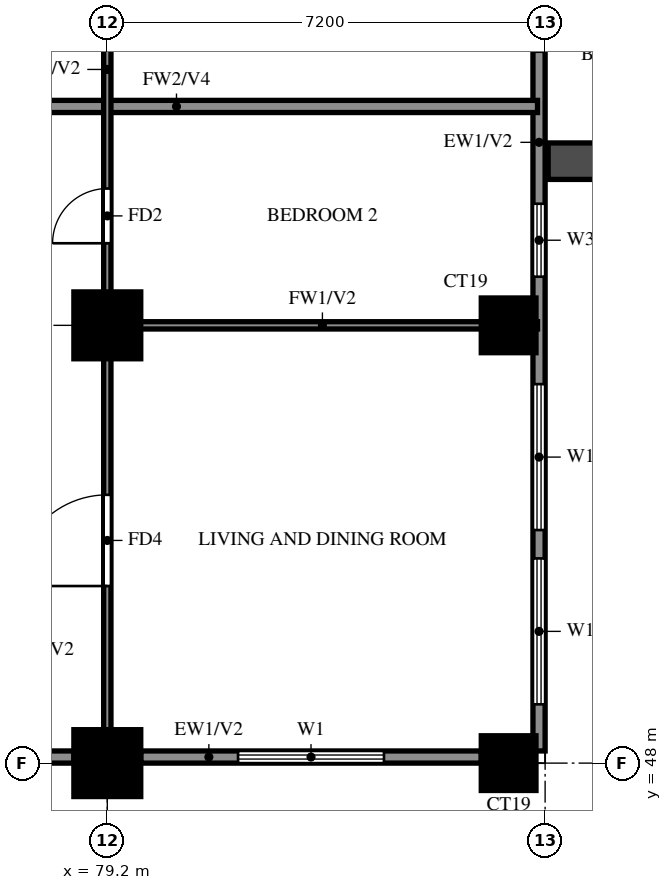
"""IFC4 building model, lengths in metres.
Left out: names, types, materials, properties, quantities, classifications, styles, units other than length and angle.
Written with IfcOpenShell. Run it as: python <this file> out.ifc"""

import sys

from ifc_helpers import new_model, si_unit, direction, frame, frame_2d, origin, origin_2d, place, context, subcontext, project, spatial, rectangle, extrude, source, transform, mapped, element, fill, save


model = new_model("IFC4")
c1 = context("Model", 3, precision=1e-05, world=origin(), true_north=direction((0.0, 1.0)))
c2 = subcontext(c1, "Body", "Model", "MODEL_VIEW")
j1 = project(units=[si_unit("LENGTHUNIT", "METRE"), si_unit("PLANEANGLEUNIT", "RADIAN")], contexts=[c1])
p1 = place(None, origin())
s1 = spatial("IfcSite", under=j1, at=p1, CompositionType="ELEMENT")
p2 = place(p1, origin())
s2 = spatial("IfcBuilding", under=s1, at=p2, CompositionType="ELEMENT")
p3 = place(p2, frame((0.0, 0.0, 127.0)))
s3 = spatial("IfcBuildingStorey", under=s2, at=p3, CompositionType="ELEMENT", Elevation=127.0)
m1 = source(origin(), c2, "Body", "SweptSolid", [
    extrude(rectangle(XDim=1.1, YDim=1.1, at=origin_2d()), origin(), (0.0, 0.0, 1.0), 3.2),
])
p4 = place(p3, frame((79.2, 48.0, 0.0), z_axis=(0.0, 0.0, 1.0), x_axis=(1.0, 0.0, 0.0)))
e1 = element("IfcColumn", 1, at=p4, inside=s3, PredefinedType="COLUMN", context=c2, shape_type="MappedRepresentation", body=[
    mapped(m1, transform((0.0, 0.0, 0.0))),
])
m2 = source(origin(), c2, "Body", "SweptSolid", [
    extrude(rectangle(XDim=0.9, YDim=0.9, at=origin_2d()), origin(), (0.0, 0.0, 1.0), 3.2),
])
p5 = place(p3, frame((85.8, 48.0, 0.0), z_axis=(0.0, 0.0, 1.0), x_axis=(1.0, 0.0, 0.0)))
e2 = element("IfcColumn", 2, at=p5, inside=s3, PredefinedType="COLUMN", context=c2, shape_type="MappedRepresentation", body=[
    mapped(m2, transform((0.0, 0.0, 0.0))),
])
p6 = place(p3, frame((79.2, 55.2, 0.0), z_axis=(0.0, 0.0, 1.0), x_axis=(1.0, 0.0, 0.0)))
e3 = element("IfcColumn", 3, at=p6, inside=s3, PredefinedType="COLUMN", context=c2, shape_type="MappedRepresentation", body=[
    mapped(m1, transform((0.0, 0.0, 0.0))),
])
p7 = place(p3, frame((85.8, 55.2, 0.0), z_axis=(0.0, 0.0, 1.0), x_axis=(1.0, 0.0, 0.0)))
e4 = element("IfcColumn", 4, at=p7, inside=s3, PredefinedType="COLUMN", context=c2, shape_type="MappedRepresentation", body=[
    mapped(m2, transform((0.0, 0.0, 0.0))),
])
p8 = place(p3, frame((85.719, 39.881, 0.0), z_axis=(0.0, 0.0, 1.0), x_axis=(-0.86377618652, 0.503875678716, 0.0)))
e5 = element("IfcWall", 5, at=p8, inside=s3, PredefinedType="SOLIDWALL", context=c2, shape_type="SweptSolid", body=[
    extrude(rectangle(XDim=16.311, YDim=0.2, at=frame_2d((8.156, 0.0))), origin(), (0.0, 0.0, 1.0), 3.2),
])
p9 = place(p8, frame((13.326, 0.0, 1.5)))
e6 = element("IfcOpeningElement", 6, at=p9, cuts=e5, PredefinedType="OPENING", context=c2, shape_type="SweptSolid", body=[
    extrude(rectangle(XDim=0.9, YDim=0.9, at=frame_2d((0.45, 0.45))), frame((0.0, 0.11, 0.0), z_axis=(0.0, -1.0, 0.0), x_axis=(1.0, 0.0, 0.0)), (0.0, 0.0, 1.0), 0.22),
])
p10 = place(p3, frame((71.99, 48.1, 0.0), z_axis=(0.0, 0.0, 1.0), x_axis=(1.0, 0.0, 0.0)))
e7 = element("IfcWall", 7, at=p10, inside=s3, PredefinedType="SOLIDWALL", context=c2, shape_type="SweptSolid", body=[
    extrude(rectangle(XDim=6.66, YDim=0.2, at=frame_2d((3.33, 0.0))), origin(), (0.0, 0.0, 1.0), 3.2),
])
p11 = place(p3, frame((79.75, 48.1, 0.0), z_axis=(0.0, 0.0, 1.0), x_axis=(1.0, 0.0, 0.0)))
e8 = element("IfcWall", 8, at=p11, inside=s3, PredefinedType="SOLIDWALL", context=c2, shape_type="SweptSolid", body=[
    extrude(rectangle(XDim=5.6, YDim=0.2, at=frame_2d((2.8, 0.0))), origin(), (0.0, 0.0, 1.0), 3.2),
])
p12 = place(p11, frame((1.6, 0.0, 0.6)))
e9 = element("IfcOpeningElement", 9, at=p12, cuts=e8, PredefinedType="OPENING", context=c2, shape_type="SweptSolid", body=[
    extrude(rectangle(XDim=2.4, YDim=2.4, at=frame_2d((1.2, 1.2))), frame((0.0, 0.11, 0.0), z_axis=(0.0, -1.0, 0.0), x_axis=(1.0, 0.0, 0.0)), (0.0, 0.0, 1.0), 0.22),
])
p13 = place(p3, frame((86.3, 48.2, 0.0), z_axis=(0.0, 0.0, 1.0), x_axis=(0.0, 1.0, 0.0)))
e10 = element("IfcWall", 10, at=p13, inside=s3, PredefinedType="SOLIDWALL", context=c2, shape_type="SweptSolid", body=[
    extrude(rectangle(XDim=28.6, YDim=0.2, at=frame_2d((14.3, 0.0))), origin(), (0.0, 0.0, 1.0), 3.2),
])
p14 = place(p13, frame((11.5, 0.0, 0.0)))
e11 = element("IfcOpeningElement", 11, at=p14, cuts=e10, PredefinedType="OPENING", context=c2, shape_type="SweptSolid", body=[
    extrude(rectangle(XDim=1.8, YDim=2.4, at=frame_2d((0.9, 1.2))), frame((0.0, 0.11, 0.0), z_axis=(0.0, -1.0, 0.0), x_axis=(1.0, 0.0, 0.0)), (0.0, 0.0, 1.0), 0.22),
])
p15 = place(p13, frame((0.767, 0.0, 0.6)))
e12 = element("IfcOpeningElement", 12, at=p15, cuts=e10, PredefinedType="OPENING", context=c2, shape_type="SweptSolid", body=[
    extrude(rectangle(XDim=2.4, YDim=2.4, at=frame_2d((1.2, 1.2))), frame((0.0, 0.11, 0.0), z_axis=(0.0, -1.0, 0.0), x_axis=(1.0, 0.0, 0.0)), (0.0, 0.0, 1.0), 0.22),
])
p16 = place(p13, frame((3.633, 0.0, 0.6)))
e13 = element("IfcOpeningElement", 13, at=p16, cuts=e10, PredefinedType="OPENING", context=c2, shape_type="SweptSolid", body=[
    extrude(rectangle(XDim=2.4, YDim=2.4, at=frame_2d((1.2, 1.2))), frame((0.0, 0.11, 0.0), z_axis=(0.0, -1.0, 0.0), x_axis=(1.0, 0.0, 0.0)), (0.0, 0.0, 1.0), 0.22),
])
p17 = place(p13, frame((7.8, 0.0, 0.6)))
e14 = element("IfcOpeningElement", 14, at=p17, cuts=e10, PredefinedType="OPENING", context=c2, shape_type="SweptSolid", body=[
    extrude(rectangle(XDim=1.2, YDim=2.4, at=frame_2d((0.6, 1.2))), frame((0.0, 0.11, 0.0), z_axis=(0.0, -1.0, 0.0), x_axis=(1.0, 0.0, 0.0)), (0.0, 0.0, 1.0), 0.22),
])
p18 = place(p13, frame((14.85, 0.0, 0.6)))
e15 = element("IfcOpeningElement", 15, at=p18, cuts=e10, PredefinedType="OPENING", context=c2, shape_type="SweptSolid", body=[
    extrude(rectangle(XDim=0.9, YDim=2.4, at=frame_2d((0.45, 1.2))), frame((0.0, 0.11, 0.0), z_axis=(0.0, -1.0, 0.0), x_axis=(1.0, 0.0, 0.0)), (0.0, 0.0, 1.0), 0.22),
])
p19 = place(p13, frame((16.75, 0.0, 0.6)))
e16 = element("IfcOpeningElement", 16, at=p19, cuts=e10, PredefinedType="OPENING", context=c2, shape_type="SweptSolid", body=[
    extrude(rectangle(XDim=0.9, YDim=2.4, at=frame_2d((0.45, 1.2))), frame((0.0, 0.11, 0.0), z_axis=(0.0, -1.0, 0.0), x_axis=(1.0, 0.0, 0.0)), (0.0, 0.0, 1.0), 0.22),
])
p20 = place(p13, frame((18.2, 0.0, 0.6)))
e17 = element("IfcOpeningElement", 17, at=p20, cuts=e10, PredefinedType="OPENING", context=c2, shape_type="SweptSolid", body=[
    extrude(rectangle(XDim=2.4, YDim=2.4, at=frame_2d((1.2, 1.2))), frame((0.0, 0.11, 0.0), z_axis=(0.0, -1.0, 0.0), x_axis=(1.0, 0.0, 0.0)), (0.0, 0.0, 1.0), 0.22),
])
p21 = place(p13, frame((22.5, 0.0, 0.6)))
e18 = element("IfcOpeningElement", 18, at=p21, cuts=e10, PredefinedType="OPENING", context=c2, shape_type="SweptSolid", body=[
    extrude(rectangle(XDim=1.8, YDim=2.4, at=frame_2d((0.9, 1.2))), frame((0.0, 0.11, 0.0), z_axis=(0.0, -1.0, 0.0), x_axis=(1.0, 0.0, 0.0)), (0.0, 0.0, 1.0), 0.22),
])
p22 = place(p13, frame((25.4, 0.0, 0.6)))
e19 = element("IfcOpeningElement", 19, at=p22, cuts=e10, PredefinedType="OPENING", context=c2, shape_type="SweptSolid", body=[
    extrude(rectangle(XDim=2.4, YDim=2.4, at=frame_2d((1.2, 1.2))), frame((0.0, 0.11, 0.0), z_axis=(0.0, -1.0, 0.0), x_axis=(1.0, 0.0, 0.0)), (0.0, 0.0, 1.0), 0.22),
])
p23 = place(p3, frame((86.45, 57.9, 0.0), z_axis=(0.0, 0.0, 1.0), x_axis=(1.0, 0.0, 0.0)))
e20 = element("IfcWall", 20, at=p23, inside=s3, PredefinedType="SOLIDWALL", context=c2, shape_type="SweptSolid", body=[
    extrude(rectangle(XDim=2.65, YDim=0.6, at=frame_2d((1.325, 0.0))), origin(), (0.0, 0.0, 1.0), 2.85),
])
p24 = place(p3, frame((74.4, 58.8, 0.0), z_axis=(0.0, 0.0, 1.0), x_axis=(1.0, 0.0, 0.0)))
e21 = element("IfcWall", 21, at=p24, inside=s3, PredefinedType="SOLIDWALL", context=c2, shape_type="SweptSolid", body=[
    extrude(rectangle(XDim=11.875, YDim=0.2, at=frame_2d((5.938, 0.0))), origin(), (0.0, 0.0, 1.0), 2.3),
])
p25 = place(p3, frame((79.2, 55.2, 0.0), z_axis=(0.0, 0.0, 1.0), x_axis=(1.0, 0.0, 0.0)))
e22 = element("IfcWall", 22, at=p25, inside=s3, PredefinedType="PARTITIONING", context=c2, shape_type="SweptSolid", body=[
    extrude(rectangle(XDim=7.075, YDim=0.12, at=frame_2d((3.538, 0.0))), origin(), (0.0, 0.0, 1.0), 3.2),
])
p26 = place(p3, frame((79.2, 48.125, 0.0), z_axis=(0.0, 0.0, 1.0), x_axis=(0.0, 1.0, 0.0)))
e23 = element("IfcWall", 23, at=p26, inside=s3, PredefinedType="PARTITIONING", context=c2, shape_type="SweptSolid", body=[
    extrude(rectangle(XDim=25.075, YDim=0.12, at=frame_2d((12.538, 0.0))), origin(), (0.0, 0.0, 1.0), 3.2),
])
p27 = place(p26, frame((2.788, 0.0, 0.0)))
e24 = element("IfcOpeningElement", 24, at=p27, cuts=e23, PredefinedType="OPENING", context=c2, shape_type="SweptSolid", body=[
    extrude(rectangle(XDim=1.5, YDim=2.1, at=frame_2d((0.75, 1.05))), frame((0.0, 0.07, 0.0), z_axis=(0.0, -1.0, 0.0), x_axis=(1.0, 0.0, 0.0)), (0.0, 0.0, 1.0), 0.14),
])
p28 = place(p26, frame((8.425, 0.0, 0.0)))
e25 = element("IfcOpeningElement", 25, at=p28, cuts=e23, PredefinedType="OPENING", context=c2, shape_type="SweptSolid", body=[
    extrude(rectangle(XDim=0.9, YDim=2.1, at=frame_2d((0.45, 1.05))), frame((0.0, 0.07, 0.0), z_axis=(0.0, -1.0, 0.0), x_axis=(1.0, 0.0, 0.0)), (0.0, 0.0, 1.0), 0.14),
])
p29 = place(p26, frame((12.025, 0.0, 0.0)))
e26 = element("IfcOpeningElement", 26, at=p29, cuts=e23, PredefinedType="OPENING", context=c2, shape_type="SweptSolid", body=[
    extrude(rectangle(XDim=0.9, YDim=2.1, at=frame_2d((0.45, 1.05))), frame((0.0, 0.07, 0.0), z_axis=(0.0, -1.0, 0.0), x_axis=(1.0, 0.0, 0.0)), (0.0, 0.0, 1.0), 0.14),
])
p30 = place(p26, frame((15.625, 0.0, 0.0)))
e27 = element("IfcOpeningElement", 27, at=p30, cuts=e23, PredefinedType="OPENING", context=c2, shape_type="SweptSolid", body=[
    extrude(rectangle(XDim=0.9, YDim=2.1, at=frame_2d((0.45, 1.05))), frame((0.0, 0.07, 0.0), z_axis=(0.0, -1.0, 0.0), x_axis=(1.0, 0.0, 0.0)), (0.0, 0.0, 1.0), 0.14),
])
p31 = place(p26, frame((19.225, 0.0, 0.0)))
e28 = element("IfcOpeningElement", 28, at=p31, cuts=e23, PredefinedType="OPENING", context=c2, shape_type="SweptSolid", body=[
    extrude(rectangle(XDim=0.9, YDim=2.1, at=frame_2d((0.45, 1.05))), frame((0.0, 0.07, 0.0), z_axis=(0.0, -1.0, 0.0), x_axis=(1.0, 0.0, 0.0)), (0.0, 0.0, 1.0), 0.14),
])
p32 = place(p26, frame((22.825, 0.0, 0.0)))
e29 = element("IfcOpeningElement", 29, at=p32, cuts=e23, PredefinedType="OPENING", context=c2, shape_type="SweptSolid", body=[
    extrude(rectangle(XDim=0.9, YDim=2.1, at=frame_2d((0.45, 1.05))), frame((0.0, 0.07, 0.0), z_axis=(0.0, -1.0, 0.0), x_axis=(1.0, 0.0, 0.0)), (0.0, 0.0, 1.0), 0.14),
])
p33 = place(p12, origin())
e30 = element("IfcWindow", 30, at=p33, inside=s3, PartitioningType="DOUBLE_PANEL_VERTICAL", PredefinedType="WINDOW", context=c2, shape_type="SweptSolid", body=[
    extrude(rectangle(XDim=2.4, YDim=2.4, at=frame_2d((1.2, 1.2))), frame((0.0, 0.03, 0.0), z_axis=(0.0, -1.0, 0.0), x_axis=(1.0, 0.0, 0.0)), (0.0, 0.0, 1.0), 0.06),
])
fill(e9, e30)
p34 = place(p14, origin())
e31 = element("IfcDoor", 31, at=p34, inside=s3, OperationType="DOUBLE_DOOR_SLIDING", PredefinedType="DOOR", context=c2, shape_type="SweptSolid", body=[
    extrude(rectangle(XDim=1.8, YDim=2.4, at=frame_2d((0.9, 1.2))), frame((0.0, 0.025, 0.0), z_axis=(0.0, -1.0, 0.0), x_axis=(1.0, 0.0, 0.0)), (0.0, 0.0, 1.0), 0.05),
])
fill(e11, e31)
p35 = place(p15, origin())
e32 = element("IfcWindow", 32, at=p35, inside=s3, PartitioningType="DOUBLE_PANEL_VERTICAL", PredefinedType="WINDOW", context=c2, shape_type="SweptSolid", body=[
    extrude(rectangle(XDim=2.4, YDim=2.4, at=frame_2d((1.2, 1.2))), frame((0.0, 0.03, 0.0), z_axis=(0.0, -1.0, 0.0), x_axis=(1.0, 0.0, 0.0)), (0.0, 0.0, 1.0), 0.06),
])
fill(e12, e32)
p36 = place(p16, origin())
e33 = element("IfcWindow", 33, at=p36, inside=s3, PartitioningType="DOUBLE_PANEL_VERTICAL", PredefinedType="WINDOW", context=c2, shape_type="SweptSolid", body=[
    extrude(rectangle(XDim=2.4, YDim=2.4, at=frame_2d((1.2, 1.2))), frame((0.0, 0.03, 0.0), z_axis=(0.0, -1.0, 0.0), x_axis=(1.0, 0.0, 0.0)), (0.0, 0.0, 1.0), 0.06),
])
fill(e13, e33)
p37 = place(p17, origin())
e34 = element("IfcWindow", 34, at=p37, inside=s3, PartitioningType="SINGLE_PANEL", PredefinedType="WINDOW", context=c2, shape_type="SweptSolid", body=[
    extrude(rectangle(XDim=1.2, YDim=2.4, at=frame_2d((0.6, 1.2))), frame((0.0, 0.03, 0.0), z_axis=(0.0, -1.0, 0.0), x_axis=(1.0, 0.0, 0.0)), (0.0, 0.0, 1.0), 0.06),
])
fill(e14, e34)
p38 = place(p27, origin())
e35 = element("IfcDoor", 35, at=p38, inside=s3, OperationType="SINGLE_SWING_LEFT", PredefinedType="DOOR", context=c2, shape_type="SweptSolid", body=[
    extrude(rectangle(XDim=1.5, YDim=2.1, at=frame_2d((0.75, 1.05))), frame((0.0, 0.025, 0.0), z_axis=(0.0, -1.0, 0.0), x_axis=(1.0, 0.0, 0.0)), (0.0, 0.0, 1.0), 0.05),
])
fill(e24, e35)
p39 = place(p28, origin())
e36 = element("IfcDoor", 36, at=p39, inside=s3, OperationType="SINGLE_SWING_LEFT", PredefinedType="DOOR", context=c2, shape_type="SweptSolid", body=[
    extrude(rectangle(XDim=0.9, YDim=2.1, at=frame_2d((0.45, 1.05))), frame((0.0, 0.025, 0.0), z_axis=(0.0, -1.0, 0.0), x_axis=(1.0, 0.0, 0.0)), (0.0, 0.0, 1.0), 0.05),
])
fill(e25, e36)
save(model, sys.argv[1])
